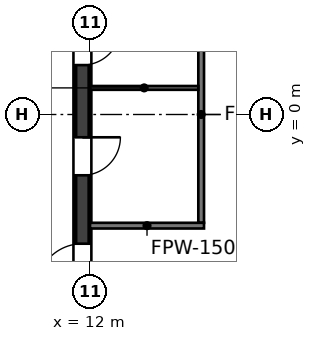
"""IFC4 building model, lengths in metres.
Left out: names, types, materials, properties, quantities, classifications, styles, units other than length and angle.
Written with IfcOpenShell. Run it as: python <this file> out.ifc"""

import sys

from ifc_helpers import new_model, si_unit, direction, frame, frame_2d, origin, place, context, subcontext, project, spatial, rectangle, extrude, element, fill, save


model = new_model("IFC4")
c1 = context("Model", 3, precision=1e-05, world=origin(), true_north=direction((0.0, 1.0)))
c2 = subcontext(c1, "Body", "Model", "MODEL_VIEW")
j1 = project(units=[si_unit("LENGTHUNIT", "METRE"), si_unit("PLANEANGLEUNIT", "RADIAN")], contexts=[c1])
p1 = place(None, origin())
s1 = spatial("IfcSite", under=j1, at=p1, CompositionType="ELEMENT")
p2 = place(p1, origin())
s2 = spatial("IfcBuilding", under=s1, at=p2, CompositionType="ELEMENT")
p3 = place(p2, frame((0.0, 0.0, 221.6)))
s3 = spatial("IfcBuildingStorey", under=s2, at=p3, CompositionType="ELEMENT", Elevation=221.6)
p4 = place(p3, frame((11.8, -5.5, 0.0), z_axis=(0.0, 0.0, 1.0), x_axis=(0.0, 1.0, 0.0)))
e1 = element("IfcWall", 1, at=p4, inside=s3, PredefinedType="SHEAR", context=c2, shape_type="SweptSolid", body=[
    extrude(rectangle(XDim=11.0, YDim=0.4, at=frame_2d((5.5, 0.0))), origin(), (0.0, 0.0, 1.0), 4.0),
])
p5 = place(p4, frame((3.9, 0.0, 0.0)))
e2 = element("IfcOpeningElement", 2, at=p5, cuts=e1, PredefinedType="OPENING", context=c2, shape_type="SweptSolid", body=[
    extrude(rectangle(XDim=1.0, YDim=2.1, at=frame_2d((0.5, 1.05))), frame((0.0, 0.2, 0.0), z_axis=(0.0, -1.0, 0.0), x_axis=(1.0, 0.0, 0.0)), (0.0, 0.0, 1.0), 0.4),
])
p6 = place(p4, frame((6.8, 0.0, 0.0)))
e3 = element("IfcOpeningElement", 3, at=p6, cuts=e1, PredefinedType="OPENING", context=c2, shape_type="SweptSolid", body=[
    extrude(rectangle(XDim=1.0, YDim=2.1, at=frame_2d((0.5, 1.05))), frame((0.0, 0.2, 0.0), z_axis=(0.0, -1.0, 0.0), x_axis=(1.0, 0.0, 0.0)), (0.0, 0.0, 1.0), 0.4),
])
p7 = place(p4, frame((0.9, 0.0, 0.0)))
e4 = element("IfcOpeningElement", 4, at=p7, cuts=e1, PredefinedType="OPENING", context=c2, shape_type="SweptSolid", body=[
    extrude(rectangle(XDim=1.2, YDim=2.1, at=frame_2d((0.6, 1.05))), frame((0.0, 0.2, 0.0), z_axis=(0.0, -1.0, 0.0), x_axis=(1.0, 0.0, 0.0)), (0.0, 0.0, 1.0), 0.4),
])
p8 = place(p4, frame((8.9, 0.0, 0.0)))
e5 = element("IfcOpeningElement", 5, at=p8, cuts=e1, PredefinedType="OPENING", context=c2, shape_type="SweptSolid", body=[
    extrude(rectangle(XDim=1.2, YDim=2.1, at=frame_2d((0.6, 1.05))), frame((0.0, 0.2, 0.0), z_axis=(0.0, -1.0, 0.0), x_axis=(1.0, 0.0, 0.0)), (0.0, 0.0, 1.0), 0.4),
])
p9 = place(p3, frame((14.925, -2.85, 0.0), z_axis=(0.0, 0.0, 1.0), x_axis=(0.0, 1.0, 0.0)))
e6 = element("IfcWall", 6, at=p9, inside=s3, PredefinedType="PARTITIONING", context=c2, shape_type="SweptSolid", body=[
    extrude(rectangle(XDim=5.7, YDim=0.15, at=frame_2d((2.85, 0.0))), origin(), (0.0, 0.0, 1.0), 2.918),
])
p10 = place(p3, frame((12.0, -2.925, 0.0), z_axis=(0.0, 0.0, 1.0), x_axis=(1.0, 0.0, 0.0)))
e7 = element("IfcWall", 7, at=p10, inside=s3, PredefinedType="PARTITIONING", context=c2, shape_type="SweptSolid", body=[
    extrude(rectangle(XDim=3.0, YDim=0.15, at=frame_2d((1.5, 0.0))), origin(), (0.0, 0.0, 1.0), 2.918),
])
p11 = place(p3, frame((12.0, 0.7, 0.0), z_axis=(0.0, 0.0, 1.0), x_axis=(1.0, 0.0, 0.0)))
e8 = element("IfcWall", 8, at=p11, inside=s3, PredefinedType="PARTITIONING", context=c2, shape_type="SweptSolid", body=[
    extrude(rectangle(XDim=2.85, YDim=0.1, at=frame_2d((1.425, 0.0))), origin(), (0.0, 0.0, 1.0), 2.918),
])
p12 = place(p5, origin())
e9 = element("IfcDoor", 9, at=p12, inside=s3, OperationType="SINGLE_SWING_RIGHT", PredefinedType="DOOR", context=c2, shape_type="SweptSolid", body=[
    extrude(rectangle(XDim=1.0, YDim=2.1, at=frame_2d((0.5, 1.05))), frame((0.0, 0.025, 0.0), z_axis=(0.0, -1.0, 0.0), x_axis=(1.0, 0.0, 0.0)), (0.0, 0.0, 1.0), 0.05),
])
fill(e2, e9)
p13 = place(p6, origin())
e10 = element("IfcDoor", 10, at=p13, inside=s3, OperationType="SINGLE_SWING_RIGHT", PredefinedType="DOOR", context=c2, shape_type="SweptSolid", body=[
    extrude(rectangle(XDim=1.0, YDim=2.1, at=frame_2d((0.5, 1.05))), frame((0.0, 0.025, 0.0), z_axis=(0.0, -1.0, 0.0), x_axis=(1.0, 0.0, 0.0)), (0.0, 0.0, 1.0), 0.05),
])
fill(e3, e10)
p14 = place(p7, origin())
e11 = element("IfcDoor", 11, at=p14, inside=s3, OperationType="SINGLE_SWING_LEFT", PredefinedType="DOOR", context=c2, shape_type="SweptSolid", body=[
    extrude(rectangle(XDim=1.2, YDim=2.1, at=frame_2d((0.6, 1.05))), frame((0.0, 0.025, 0.0), z_axis=(0.0, -1.0, 0.0), x_axis=(1.0, 0.0, 0.0)), (0.0, 0.0, 1.0), 0.05),
])
fill(e4, e11)
save(model, sys.argv[1])
